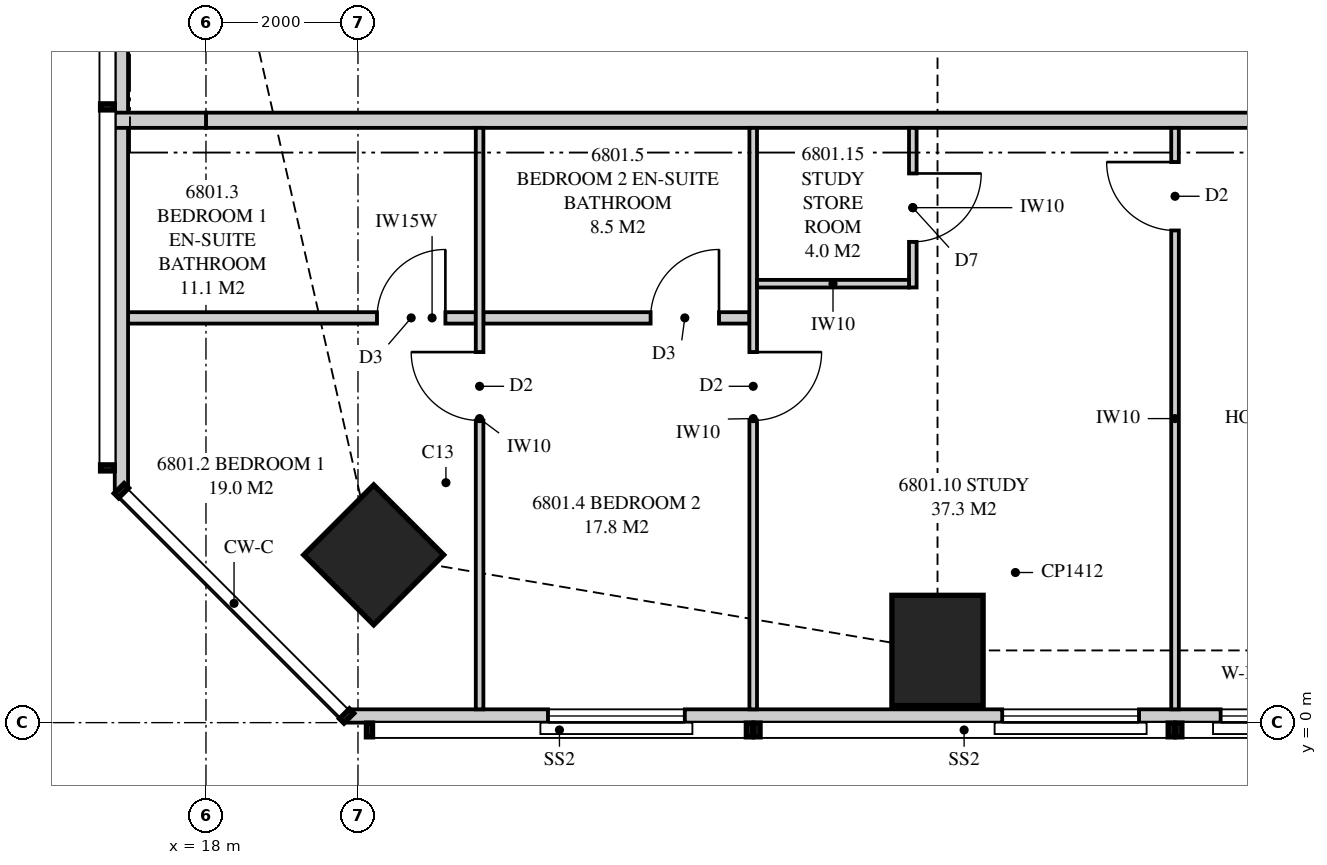
"""IFC4 building model, lengths in metres.
Left out: names, types, materials, properties, quantities, classifications, styles, units other than length and angle.
Written with IfcOpenShell. Run it as: python <this file> out.ifc"""

import sys

from ifc_helpers import new_model, si_unit, direction, frame, frame_2d, origin, origin_2d, place, context, subcontext, project, spatial, polyline, rectangle, outline, extrude, element, fill, save


model = new_model("IFC4")
c1 = context("Model", 3, precision=1e-05, world=origin(), true_north=direction((0.0, 1.0)))
c2 = subcontext(c1, "Body", "Model", "MODEL_VIEW")
j1 = project(units=[si_unit("LENGTHUNIT", "METRE"), si_unit("PLANEANGLEUNIT", "RADIAN")], contexts=[c1])
p1 = place(None, origin())
s1 = spatial("IfcSite", under=j1, at=p1, CompositionType="ELEMENT")
p2 = place(p1, origin())
s2 = spatial("IfcBuilding", under=s1, at=p2, CompositionType="ELEMENT")
p3 = place(p2, frame((0.0, 0.0, 249.45)))
s3 = spatial("IfcBuildingStorey", under=s2, at=p3, CompositionType="ELEMENT", Elevation=249.45)
p4 = place(p3, frame((20.207, 2.207, 0.0), z_axis=(0.0, 0.0, 1.0), x_axis=(0.707106781187, 0.707106781187, 0.0)))
e1 = element("IfcColumn", 1, at=p4, inside=s3, PredefinedType="COLUMN", context=c2, shape_type="SweptSolid", body=[
    extrude(rectangle(XDim=1.3, YDim=1.3, at=origin_2d()), origin(), (0.0, 0.0, 1.0), 3.5),
])
p5 = place(p3, frame((27.625, 0.95, 0.0), z_axis=(0.0, 0.0, 1.0), x_axis=(0.0, 1.0, 0.0)))
e2 = element("IfcColumn", 2, at=p5, inside=s3, PredefinedType="COLUMN", context=c2, shape_type="SweptSolid", body=[
    extrude(rectangle(XDim=1.45, YDim=1.2, at=origin_2d()), origin(), (0.0, 0.0, 1.0), 3.5),
])
p6 = place(p3, frame((19.851, 0.087, 0.0), z_axis=(0.0, 0.0, 1.0), x_axis=(1.0, 0.0, 0.0)))
e3 = element("IfcWall", 3, at=p6, inside=s3, PredefinedType="SOLIDWALL", context=c2, shape_type="SweptSolid", body=[
    extrude(outline(polyline([(0.0, 0.0), (33.597, 0.0), (33.597, 3.26), (27.239, 3.26), (27.239, 2.3), (27.155, 2.3), (27.155, 3.26), (27.024, 3.26), (27.024, 2.3), (7.774, 2.3), (7.774, 3.26), (7.642, 3.26), (7.642, 2.3), (7.559, 2.3), (7.559, 3.26), (0.0, 3.26), (0.0, 0.0)])), frame((0.0, 0.087, 0.0), z_axis=(0.0, -1.0, 0.0), x_axis=(1.0, 0.0, 0.0)), (0.0, 0.0, 1.0), 0.175),
])
p7 = place(p6, frame((2.649, 0.0, 0.4)))
e4 = element("IfcOpeningElement", 4, at=p7, cuts=e3, PredefinedType="OPENING", context=c2, shape_type="SweptSolid", body=[
    extrude(rectangle(XDim=1.8, YDim=1.85, at=frame_2d((0.9, 0.925))), frame((0.0, 0.097, 0.0), z_axis=(0.0, -1.0, 0.0), x_axis=(1.0, 0.0, 0.0)), (0.0, 0.0, 1.0), 0.195),
])
p8 = place(p6, frame((8.625, 0.0, 0.4)))
e5 = element("IfcOpeningElement", 5, at=p8, cuts=e3, PredefinedType="OPENING", context=c2, shape_type="SweptSolid", body=[
    extrude(rectangle(XDim=1.8, YDim=1.85, at=frame_2d((0.9, 0.925))), frame((0.0, 0.097, 0.0), z_axis=(0.0, -1.0, 0.0), x_axis=(1.0, 0.0, 0.0)), (0.0, 0.0, 1.0), 0.195),
])
p9 = place(p6, frame((11.499, 0.0, 0.4)))
e6 = element("IfcOpeningElement", 6, at=p9, cuts=e3, PredefinedType="OPENING", context=c2, shape_type="SweptSolid", body=[
    extrude(rectangle(XDim=1.8, YDim=1.85, at=frame_2d((0.9, 0.925))), frame((0.0, 0.097, 0.0), z_axis=(0.0, -1.0, 0.0), x_axis=(1.0, 0.0, 0.0)), (0.0, 0.0, 1.0), 0.195),
])
p10 = place(p6, frame((14.359, 0.0, 0.0)))
e7 = element("IfcOpeningElement", 7, at=p10, cuts=e3, PredefinedType="OPENING", context=c2, shape_type="SweptSolid", body=[
    extrude(rectangle(XDim=1.8, YDim=2.25, at=frame_2d((0.9, 1.125))), frame((0.0, 0.097, 0.0), z_axis=(0.0, -1.0, 0.0), x_axis=(1.0, 0.0, 0.0)), (0.0, 0.0, 1.0), 0.195),
])
p11 = place(p6, frame((19.299, 0.0, 0.4)))
e8 = element("IfcOpeningElement", 8, at=p11, cuts=e3, PredefinedType="OPENING", context=c2, shape_type="SweptSolid", body=[
    extrude(rectangle(XDim=1.8, YDim=1.85, at=frame_2d((0.9, 0.925))), frame((0.0, 0.097, 0.0), z_axis=(0.0, -1.0, 0.0), x_axis=(1.0, 0.0, 0.0)), (0.0, 0.0, 1.0), 0.195),
])
p12 = place(p6, frame((23.674, 0.0, 0.4)))
e9 = element("IfcOpeningElement", 9, at=p12, cuts=e3, PredefinedType="OPENING", context=c2, shape_type="SweptSolid", body=[
    extrude(rectangle(XDim=2.4, YDim=1.85, at=frame_2d((1.2, 0.925))), frame((0.0, 0.097, 0.0), z_axis=(0.0, -1.0, 0.0), x_axis=(1.0, 0.0, 0.0)), (0.0, 0.0, 1.0), 0.195),
])
p13 = place(p6, frame((30.349, 0.0, 0.4)))
e10 = element("IfcOpeningElement", 10, at=p13, cuts=e3, PredefinedType="OPENING", context=c2, shape_type="SweptSolid", body=[
    extrude(rectangle(XDim=1.8, YDim=1.85, at=frame_2d((0.9, 0.925))), frame((0.0, 0.097, 0.0), z_axis=(0.0, -1.0, 0.0), x_axis=(1.0, 0.0, 0.0)), (0.0, 0.0, 1.0), 0.195),
])
p14 = place(p3, frame((16.887, 30.949, 0.0), z_axis=(0.0, 0.0, 1.0), x_axis=(0.0, -1.0, 0.0)))
e11 = element("IfcWall", 11, at=p14, inside=s3, PredefinedType="SOLIDWALL", context=c2, shape_type="SweptSolid", body=[
    extrude(outline(polyline([(0.0, 0.0), (27.897, 0.0), (27.897, 3.26), (18.148, 3.26), (18.148, 2.3), (18.125, 2.3), (18.125, 3.26), (17.949, 3.26), (17.949, 2.3), (5.949, 2.3), (5.949, 3.26), (0.0, 3.26), (0.0, 0.0)])), frame((0.0, 0.087, 0.0), z_axis=(0.0, -1.0, 0.0), x_axis=(1.0, 0.0, 0.0)), (0.0, 0.0, 1.0), 0.175),
])
p15 = place(p14, frame((11.849, 0.0, 0.4)))
e12 = element("IfcOpeningElement", 12, at=p15, cuts=e11, PredefinedType="OPENING", context=c2, shape_type="SweptSolid", body=[
    extrude(rectangle(XDim=1.2, YDim=1.85, at=frame_2d((0.6, 0.925))), frame((0.0, 0.097, 0.0), z_axis=(0.0, -1.0, 0.0), x_axis=(1.0, 0.0, 0.0)), (0.0, 0.0, 1.0), 0.195),
])
p16 = place(p3, frame((18.0, 7.925, 0.0), z_axis=(0.0, 0.0, 1.0), x_axis=(1.0, 0.0, 0.0)))
e13 = element("IfcWall", 13, at=p16, inside=s3, PredefinedType="PARTITIONING", context=c2, shape_type="SweptSolid", body=[
    extrude(outline(polyline([(0.0, 0.0), (38.325, 0.0), (38.325, 3.26), (37.875, 3.26), (37.875, 2.3), (36.043, 2.3), (36.043, 3.26), (30.185, 3.26), (30.185, 2.66), (27.565, 2.66), (27.565, 3.26), (20.56, 3.26), (20.56, 2.66), (17.94, 2.66), (17.94, 3.26), (10.935, 3.26), (10.935, 2.66), (8.315, 2.66), (8.315, 3.26), (1.839, 3.26), (1.839, 2.3), (0.0, 2.3), (0.0, 3.26), (0.0, 0.0)])), frame((0.0, 0.1, 0.0), z_axis=(0.0, -1.0, 0.0), x_axis=(1.0, 0.0, 0.0)), (0.0, 0.0, 1.0), 0.2),
])
p17 = place(p16, frame((18.75, 0.0, 0.0)))
e14 = element("IfcOpeningElement", 14, at=p17, cuts=e13, PredefinedType="OPENING", context=c2, shape_type="SweptSolid", body=[
    extrude(rectangle(XDim=1.05, YDim=2.2, at=frame_2d((0.525, 1.1))), frame((0.0, 0.11, 0.0), z_axis=(0.0, -1.0, 0.0), x_axis=(1.0, 0.0, 0.0)), (0.0, 0.0, 1.0), 0.22),
])
p18 = place(p3, frame((21.6, 0.175, 0.0), z_axis=(0.0, 0.0, 1.0), x_axis=(0.0, 1.0, 0.0)))
e15 = element("IfcWall", 15, at=p18, inside=s3, PredefinedType="PARTITIONING", context=c2, shape_type="SweptSolid", body=[
    extrude(outline(polyline([(0.0, 0.0), (7.65, 0.0), (7.65, 3.26), (2.668, 3.26), (2.668, 2.3), (0.924, 2.3), (0.924, 3.26), (0.0, 3.26), (0.0, 0.0)])), frame((0.0, 0.05, 0.0), z_axis=(0.0, -1.0, 0.0), x_axis=(1.0, 0.0, 0.0)), (0.0, 0.0, 1.0), 0.1),
])
p19 = place(p18, frame((3.8, 0.0, 0.0)))
e16 = element("IfcOpeningElement", 16, at=p19, cuts=e15, PredefinedType="OPENING", context=c2, shape_type="SweptSolid", body=[
    extrude(rectangle(XDim=0.9, YDim=2.1, at=frame_2d((0.45, 1.05))), frame((0.0, 0.06, 0.0), z_axis=(0.0, -1.0, 0.0), x_axis=(1.0, 0.0, 0.0)), (0.0, 0.0, 1.0), 0.12),
])
p20 = place(p3, frame((25.2, 0.175, 0.0), z_axis=(0.0, 0.0, 1.0), x_axis=(0.0, 1.0, 0.0)))
e17 = element("IfcWall", 17, at=p20, inside=s3, PredefinedType="PARTITIONING", context=c2, shape_type="SweptSolid", body=[
    extrude(outline(polyline([(0.0, 0.0), (7.65, 0.0), (7.65, 3.26), (2.058, 3.26), (2.058, 2.3), (0.314, 2.3), (0.314, 3.26), (0.0, 3.26), (0.0, 0.0)])), frame((0.0, 0.05, 0.0), z_axis=(0.0, -1.0, 0.0), x_axis=(1.0, 0.0, 0.0)), (0.0, 0.0, 1.0), 0.1),
])
p21 = place(p20, frame((3.8, 0.0, 0.0)))
e18 = element("IfcOpeningElement", 18, at=p21, cuts=e17, PredefinedType="OPENING", context=c2, shape_type="SweptSolid", body=[
    extrude(rectangle(XDim=0.9, YDim=2.1, at=frame_2d((0.45, 1.05))), frame((0.0, 0.06, 0.0), z_axis=(0.0, -1.0, 0.0), x_axis=(1.0, 0.0, 0.0)), (0.0, 0.0, 1.0), 0.12),
])
p22 = place(p3, frame((16.8, 5.325, 0.0), z_axis=(0.0, 0.0, 1.0), x_axis=(1.0, 0.0, 0.0)))
e19 = element("IfcWall", 19, at=p22, inside=s3, PredefinedType="PLUMBINGWALL", context=c2, shape_type="SweptSolid", body=[
    extrude(outline(polyline([(0.0, 0.0), (4.75, 0.0), (4.75, 3.26), (3.605, 3.26), (3.605, 2.3), (1.79, 2.3), (1.79, 3.26), (0.0, 3.26), (0.0, 0.0)])), frame((0.0, 0.075, 0.0), z_axis=(0.0, -1.0, 0.0), x_axis=(1.0, 0.0, 0.0)), (0.0, 0.0, 1.0), 0.15),
])
p23 = place(p22, frame((3.45, 0.0, 0.0)))
e20 = element("IfcOpeningElement", 20, at=p23, cuts=e19, PredefinedType="OPENING", context=c2, shape_type="SweptSolid", body=[
    extrude(rectangle(XDim=0.9, YDim=2.1, at=frame_2d((0.45, 1.05))), frame((0.0, 0.085, 0.0), z_axis=(0.0, -1.0, 0.0), x_axis=(1.0, 0.0, 0.0)), (0.0, 0.0, 1.0), 0.17),
])
p24 = place(p3, frame((21.65, 5.325, 0.0), z_axis=(0.0, 0.0, 1.0), x_axis=(1.0, 0.0, 0.0)))
e21 = element("IfcWall", 21, at=p24, inside=s3, PredefinedType="PLUMBINGWALL", context=c2, shape_type="SweptSolid", body=[
    extrude(rectangle(XDim=3.5, YDim=0.15, at=frame_2d((1.75, 0.0))), origin(), (0.0, 0.0, 1.0), 3.26),
])
p25 = place(p24, frame((2.2, 0.0, 0.0)))
e22 = element("IfcOpeningElement", 22, at=p25, cuts=e21, PredefinedType="OPENING", context=c2, shape_type="SweptSolid", body=[
    extrude(rectangle(XDim=0.9, YDim=2.1, at=frame_2d((0.45, 1.05))), frame((0.0, 0.085, 0.0), z_axis=(0.0, -1.0, 0.0), x_axis=(1.0, 0.0, 0.0)), (0.0, 0.0, 1.0), 0.17),
])
p26 = place(p3, frame((30.75, 0.175, 0.0), z_axis=(0.0, 0.0, 1.0), x_axis=(0.0, 1.0, 0.0)))
e23 = element("IfcWall", 23, at=p26, inside=s3, PredefinedType="PARTITIONING", context=c2, shape_type="SweptSolid", body=[
    extrude(outline(polyline([(0.0, 0.0), (7.65, 0.0), (7.65, 3.26), (1.635, 3.26), (1.635, 2.3), (0.0, 2.3), (0.0, 3.26), (0.0, 0.0)])), frame((0.0, 0.05, 0.0), z_axis=(0.0, -1.0, 0.0), x_axis=(1.0, 0.0, 0.0)), (0.0, 0.0, 1.0), 0.1),
])
p27 = place(p26, frame((6.3, 0.0, 0.0)))
e24 = element("IfcOpeningElement", 24, at=p27, cuts=e23, PredefinedType="OPENING", context=c2, shape_type="SweptSolid", body=[
    extrude(rectangle(XDim=0.9, YDim=2.1, at=frame_2d((0.45, 1.05))), frame((0.0, 0.06, 0.0), z_axis=(0.0, -1.0, 0.0), x_axis=(1.0, 0.0, 0.0)), (0.0, 0.0, 1.0), 0.12),
])
p28 = place(p3, frame((16.8, 7.925, 0.0), z_axis=(0.0, 0.0, 1.0), x_axis=(1.0, 0.0, 0.0)))
e25 = element("IfcWall", 25, at=p28, inside=s3, PredefinedType="PARTITIONING", context=c2, shape_type="SweptSolid", body=[
    extrude(outline(polyline([(0.0, 0.0), (1.2, 0.0), (1.2, 3.26), (1.2, 2.3), (1.172, 2.3), (1.172, 3.26), (0.0, 3.26), (0.0, 0.0)])), frame((0.0, 0.1, 0.0), z_axis=(0.0, -1.0, 0.0), x_axis=(1.0, 0.0, 0.0)), (0.0, 0.0, 1.0), 0.2),
])
p29 = place(p3, frame((27.3, 7.825, 0.0), z_axis=(0.0, 0.0, 1.0), x_axis=(0.0, -1.0, 0.0)))
e26 = element("IfcWall", 26, at=p29, inside=s3, PredefinedType="PARTITIONING", context=c2, shape_type="SweptSolid", body=[
    extrude(outline(polyline([(0.0, 0.0), (2.1, 0.0), (2.1, 3.26), (2.1, 2.66), (0.0, 2.66), (0.0, 3.26), (0.0, 0.0)])), frame((0.0, 0.05, 0.0), z_axis=(0.0, -1.0, 0.0), x_axis=(1.0, 0.0, 0.0)), (0.0, 0.0, 1.0), 0.1),
])
p30 = place(p29, frame((0.6, 0.0, 0.0)))
e27 = element("IfcOpeningElement", 27, at=p30, cuts=e26, PredefinedType="OPENING", context=c2, shape_type="SweptSolid", body=[
    extrude(rectangle(XDim=0.9, YDim=2.1, at=frame_2d((0.45, 1.05))), frame((0.0, 0.06, 0.0), z_axis=(0.0, -1.0, 0.0), x_axis=(1.0, 0.0, 0.0)), (0.0, 0.0, 1.0), 0.12),
])
p31 = place(p3, frame((25.25, 5.775, 0.0), z_axis=(0.0, 0.0, 1.0), x_axis=(1.0, 0.0, 0.0)))
e28 = element("IfcWall", 28, at=p31, inside=s3, PredefinedType="PARTITIONING", context=c2, shape_type="SweptSolid", body=[
    extrude(outline(polyline([(0.0, 0.0), (2.0, 0.0), (2.0, 3.26), (2.0, 2.66), (1.115, 2.66), (1.115, 3.26), (0.0, 3.26), (0.0, 0.0)])), frame((0.0, 0.05, 0.0), z_axis=(0.0, -1.0, 0.0), x_axis=(1.0, 0.0, 0.0)), (0.0, 0.0, 1.0), 0.1),
])
p32 = place(p7, origin())
e29 = element("IfcWindow", 29, at=p32, inside=s3, PartitioningType="SINGLE_PANEL", PredefinedType="WINDOW", context=c2, shape_type="SweptSolid", body=[
    extrude(rectangle(XDim=1.8, YDim=1.85, at=frame_2d((0.9, 0.925))), frame((0.0, 0.03, 0.0), z_axis=(0.0, -1.0, 0.0), x_axis=(1.0, 0.0, 0.0)), (0.0, 0.0, 1.0), 0.06),
])
fill(e4, e29)
p33 = place(p8, origin())
e30 = element("IfcWindow", 30, at=p33, inside=s3, PartitioningType="SINGLE_PANEL", PredefinedType="WINDOW", context=c2, shape_type="SweptSolid", body=[
    extrude(rectangle(XDim=1.8, YDim=1.85, at=frame_2d((0.9, 0.925))), frame((0.0, 0.03, 0.0), z_axis=(0.0, -1.0, 0.0), x_axis=(1.0, 0.0, 0.0)), (0.0, 0.0, 1.0), 0.06),
])
fill(e5, e30)
p34 = place(p9, origin())
e31 = element("IfcWindow", 31, at=p34, inside=s3, PartitioningType="SINGLE_PANEL", PredefinedType="WINDOW", context=c2, shape_type="SweptSolid", body=[
    extrude(rectangle(XDim=1.8, YDim=1.85, at=frame_2d((0.9, 0.925))), frame((0.0, 0.03, 0.0), z_axis=(0.0, -1.0, 0.0), x_axis=(1.0, 0.0, 0.0)), (0.0, 0.0, 1.0), 0.06),
])
fill(e6, e31)
p35 = place(p19, origin())
e32 = element("IfcDoor", 32, at=p35, inside=s3, OperationType="SINGLE_SWING_RIGHT", PredefinedType="DOOR", context=c2, shape_type="SweptSolid", body=[
    extrude(rectangle(XDim=0.9, YDim=2.1, at=frame_2d((0.45, 1.05))), frame((0.0, 0.025, 0.0), z_axis=(0.0, -1.0, 0.0), x_axis=(1.0, 0.0, 0.0)), (0.0, 0.0, 1.0), 0.05),
])
fill(e16, e32)
p36 = place(p23, origin())
e33 = element("IfcDoor", 33, at=p36, inside=s3, OperationType="SINGLE_SWING_RIGHT", PredefinedType="DOOR", context=c2, shape_type="SweptSolid", body=[
    extrude(rectangle(XDim=0.9, YDim=2.1, at=frame_2d((0.45, 1.05))), frame((0.0, 0.025, 0.0), z_axis=(0.0, -1.0, 0.0), x_axis=(1.0, 0.0, 0.0)), (0.0, 0.0, 1.0), 0.05),
])
fill(e20, e33)
p37 = place(p21, frame((0.9, 0.0, 0.0), z_axis=(0.0, 0.0, 1.0), x_axis=(-1.0, 0.0, 0.0)))
e34 = element("IfcDoor", 34, at=p37, inside=s3, OperationType="SINGLE_SWING_LEFT", PredefinedType="DOOR", context=c2, shape_type="SweptSolid", body=[
    extrude(rectangle(XDim=0.9, YDim=2.1, at=frame_2d((0.45, 1.05))), frame((0.0, 0.025, 0.0), z_axis=(0.0, -1.0, 0.0), x_axis=(1.0, 0.0, 0.0)), (0.0, 0.0, 1.0), 0.05),
])
fill(e18, e34)
p38 = place(p25, origin())
e35 = element("IfcDoor", 35, at=p38, inside=s3, OperationType="SINGLE_SWING_RIGHT", PredefinedType="DOOR", context=c2, shape_type="SweptSolid", body=[
    extrude(rectangle(XDim=0.9, YDim=2.1, at=frame_2d((0.45, 1.05))), frame((0.0, 0.025, 0.0), z_axis=(0.0, -1.0, 0.0), x_axis=(1.0, 0.0, 0.0)), (0.0, 0.0, 1.0), 0.05),
])
fill(e22, e35)
p39 = place(p27, origin())
e36 = element("IfcDoor", 36, at=p39, inside=s3, OperationType="SINGLE_SWING_RIGHT", PredefinedType="DOOR", context=c2, shape_type="SweptSolid", body=[
    extrude(rectangle(XDim=0.9, YDim=2.1, at=frame_2d((0.45, 1.05))), frame((0.0, 0.025, 0.0), z_axis=(0.0, -1.0, 0.0), x_axis=(1.0, 0.0, 0.0)), (0.0, 0.0, 1.0), 0.05),
])
fill(e24, e36)
p40 = place(p30, origin())
e37 = element("IfcDoor", 37, at=p40, inside=s3, OperationType="SINGLE_SWING_LEFT", PredefinedType="DOOR", context=c2, shape_type="SweptSolid", body=[
    extrude(rectangle(XDim=0.9, YDim=2.1, at=frame_2d((0.45, 1.05))), frame((0.0, 0.025, 0.0), z_axis=(0.0, -1.0, 0.0), x_axis=(1.0, 0.0, 0.0)), (0.0, 0.0, 1.0), 0.05),
])
fill(e27, e37)
save(model, sys.argv[1])
